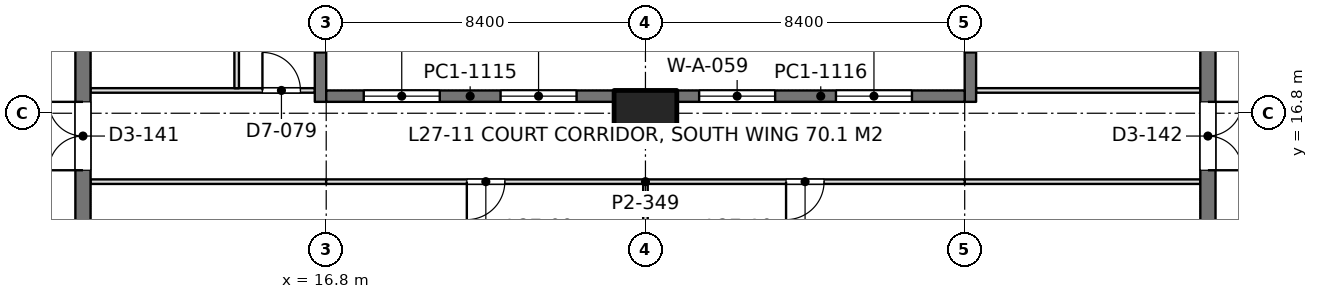
"""IFC4 building model, lengths in metres.
Left out: names, types, materials, properties, quantities, classifications, styles, units other than length and angle.
Written with IfcOpenShell. Run it as: python <this file> out.ifc"""

import sys

from ifc_helpers import new_model, si_unit, direction, frame, frame_2d, origin, origin_2d, place, context, subcontext, project, spatial, rectangle, extrude, element, fill, save


model = new_model("IFC4")
c1 = context("Model", 3, precision=1e-05, world=origin(), true_north=direction((0.0, 1.0)))
c2 = subcontext(c1, "Body", "Model", "MODEL_VIEW")
j1 = project(units=[si_unit("LENGTHUNIT", "METRE"), si_unit("PLANEANGLEUNIT", "RADIAN")], contexts=[c1])
p1 = place(None, origin())
s1 = spatial("IfcSite", under=j1, at=p1, CompositionType="ELEMENT")
p2 = place(p1, origin())
s2 = spatial("IfcBuilding", under=s1, at=p2, CompositionType="ELEMENT")
p3 = place(p2, frame((0.0, 0.0, 121.8)))
s3 = spatial("IfcBuildingStorey", under=s2, at=p3, CompositionType="ELEMENT", Elevation=121.8)
p4 = place(p3, frame((25.2, 16.8, 0.0), z_axis=(0.0, 0.0, 1.0), x_axis=(1.0, 0.0, 0.0)))
e1 = element("IfcColumn", 1, at=p4, inside=s3, PredefinedType="COLUMN", context=c2, shape_type="SweptSolid", body=[
    extrude(rectangle(XDim=1.65, YDim=1.2, at=origin_2d()), origin(), (0.0, 0.0, 1.0), 4.2),
])
p5 = place(p3, frame((10.4, 13.05, 0.0), z_axis=(0.0, 0.0, 1.0), x_axis=(0.0, 1.0, 0.0)))
e2 = element("IfcWall", 2, at=p5, inside=s3, PredefinedType="SHEAR", context=c2, shape_type="SweptSolid", body=[
    extrude(rectangle(XDim=24.3, YDim=0.4, at=frame_2d((12.15, 0.0))), origin(), (0.0, 0.0, 1.0), 4.2),
])
p6 = place(p5, frame((10.05, 0.0, 0.0)))
e3 = element("IfcOpeningElement", 3, at=p6, cuts=e2, PredefinedType="OPENING", context=c2, shape_type="SweptSolid", body=[
    extrude(rectangle(XDim=1.1, YDim=2.2, at=frame_2d((0.55, 1.1))), frame((0.0, 0.21, 0.0), z_axis=(0.0, -1.0, 0.0), x_axis=(1.0, 0.0, 0.0)), (0.0, 0.0, 1.0), 0.42),
])
p7 = place(p5, frame((12.9, 0.0, 0.0)))
e4 = element("IfcOpeningElement", 4, at=p7, cuts=e2, PredefinedType="OPENING", context=c2, shape_type="SweptSolid", body=[
    extrude(rectangle(XDim=1.1, YDim=2.2, at=frame_2d((0.55, 1.1))), frame((0.0, 0.21, 0.0), z_axis=(0.0, -1.0, 0.0), x_axis=(1.0, 0.0, 0.0)), (0.0, 0.0, 1.0), 0.42),
])
p8 = place(p5, frame((21.45, 0.0, 0.0)))
e5 = element("IfcOpeningElement", 5, at=p8, cuts=e2, PredefinedType="OPENING", context=c2, shape_type="SweptSolid", body=[
    extrude(rectangle(XDim=1.1, YDim=2.2, at=frame_2d((0.55, 1.1))), frame((0.0, 0.21, 0.0), z_axis=(0.0, -1.0, 0.0), x_axis=(1.0, 0.0, 0.0)), (0.0, 0.0, 1.0), 0.42),
])
p9 = place(p5, frame((2.25, 0.0, 0.0)))
e6 = element("IfcOpeningElement", 6, at=p9, cuts=e2, PredefinedType="OPENING", context=c2, shape_type="SweptSolid", body=[
    extrude(rectangle(XDim=1.8, YDim=2.4, at=frame_2d((0.9, 1.2))), frame((0.0, 0.21, 0.0), z_axis=(0.0, -1.0, 0.0), x_axis=(1.0, 0.0, 0.0)), (0.0, 0.0, 1.0), 0.42),
])
p10 = place(p5, frame((5.8, 0.0, 0.0)))
e7 = element("IfcOpeningElement", 7, at=p10, cuts=e2, PredefinedType="OPENING", context=c2, shape_type="SweptSolid", body=[
    extrude(rectangle(XDim=1.8, YDim=2.4, at=frame_2d((0.9, 1.2))), frame((0.0, 0.21, 0.0), z_axis=(0.0, -1.0, 0.0), x_axis=(1.0, 0.0, 0.0)), (0.0, 0.0, 1.0), 0.42),
])
p11 = place(p3, frame((40.0, 13.05, 0.0), z_axis=(0.0, 0.0, 1.0), x_axis=(0.0, 1.0, 0.0)))
e8 = element("IfcWall", 8, at=p11, inside=s3, PredefinedType="SHEAR", context=c2, shape_type="SweptSolid", body=[
    extrude(rectangle(XDim=24.3, YDim=0.4, at=frame_2d((12.15, 0.0))), origin(), (0.0, 0.0, 1.0), 4.2),
])
p12 = place(p11, frame((10.05, 0.0, 0.0)))
e9 = element("IfcOpeningElement", 9, at=p12, cuts=e8, PredefinedType="OPENING", context=c2, shape_type="SweptSolid", body=[
    extrude(rectangle(XDim=1.1, YDim=2.2, at=frame_2d((0.55, 1.1))), frame((0.0, 0.21, 0.0), z_axis=(0.0, -1.0, 0.0), x_axis=(1.0, 0.0, 0.0)), (0.0, 0.0, 1.0), 0.42),
])
p13 = place(p11, frame((12.9, 0.0, 0.0)))
e10 = element("IfcOpeningElement", 10, at=p13, cuts=e8, PredefinedType="OPENING", context=c2, shape_type="SweptSolid", body=[
    extrude(rectangle(XDim=1.1, YDim=2.2, at=frame_2d((0.55, 1.1))), frame((0.0, 0.21, 0.0), z_axis=(0.0, -1.0, 0.0), x_axis=(1.0, 0.0, 0.0)), (0.0, 0.0, 1.0), 0.42),
])
p14 = place(p11, frame((21.45, 0.0, 0.0)))
e11 = element("IfcOpeningElement", 11, at=p14, cuts=e8, PredefinedType="OPENING", context=c2, shape_type="SweptSolid", body=[
    extrude(rectangle(XDim=1.1, YDim=2.2, at=frame_2d((0.55, 1.1))), frame((0.0, 0.21, 0.0), z_axis=(0.0, -1.0, 0.0), x_axis=(1.0, 0.0, 0.0)), (0.0, 0.0, 1.0), 0.42),
])
p15 = place(p11, frame((2.25, 0.0, 0.0)))
e12 = element("IfcOpeningElement", 12, at=p15, cuts=e8, PredefinedType="OPENING", context=c2, shape_type="SweptSolid", body=[
    extrude(rectangle(XDim=1.8, YDim=2.4, at=frame_2d((0.9, 1.2))), frame((0.0, 0.21, 0.0), z_axis=(0.0, -1.0, 0.0), x_axis=(1.0, 0.0, 0.0)), (0.0, 0.0, 1.0), 0.42),
])
p16 = place(p11, frame((5.8, 0.0, 0.0)))
e13 = element("IfcOpeningElement", 13, at=p16, cuts=e8, PredefinedType="OPENING", context=c2, shape_type="SweptSolid", body=[
    extrude(rectangle(XDim=1.8, YDim=2.4, at=frame_2d((0.9, 1.2))), frame((0.0, 0.21, 0.0), z_axis=(0.0, -1.0, 0.0), x_axis=(1.0, 0.0, 0.0)), (0.0, 0.0, 1.0), 0.42),
])
p17 = place(p3, frame((16.65, 17.1, 0.0), z_axis=(0.0, 0.0, 1.0), x_axis=(0.0, 1.0, 0.0)))
e14 = element("IfcWall", 14, at=p17, inside=s3, PredefinedType="SOLIDWALL", context=c2, shape_type="SweptSolid", body=[
    extrude(rectangle(XDim=5.0, YDim=0.3, at=frame_2d((2.5, 0.0))), origin(), (0.0, 0.0, 1.0), 4.05),
])
p18 = place(p17, frame((1.3, 0.0, 0.1)))
e15 = element("IfcOpeningElement", 15, at=p18, cuts=e14, PredefinedType="OPENING", context=c2, shape_type="SweptSolid", body=[
    extrude(rectangle(XDim=2.0, YDim=3.0, at=frame_2d((1.0, 1.5))), frame((0.0, 0.16, 0.0), z_axis=(0.0, -1.0, 0.0), x_axis=(1.0, 0.0, 0.0)), (0.0, 0.0, 1.0), 0.32),
])
p19 = place(p3, frame((33.75, 17.1, 0.0), z_axis=(0.0, 0.0, 1.0), x_axis=(0.0, 1.0, 0.0)))
e16 = element("IfcWall", 16, at=p19, inside=s3, PredefinedType="SOLIDWALL", context=c2, shape_type="SweptSolid", body=[
    extrude(rectangle(XDim=5.0, YDim=0.3, at=frame_2d((2.5, 0.0))), origin(), (0.0, 0.0, 1.0), 4.05),
])
p20 = place(p19, frame((1.3, 0.0, 0.1)))
e17 = element("IfcOpeningElement", 17, at=p20, cuts=e16, PredefinedType="OPENING", context=c2, shape_type="SweptSolid", body=[
    extrude(rectangle(XDim=2.0, YDim=3.0, at=frame_2d((1.0, 1.5))), frame((0.0, 0.16, 0.0), z_axis=(0.0, -1.0, 0.0), x_axis=(1.0, 0.0, 0.0)), (0.0, 0.0, 1.0), 0.32),
])
p21 = place(p3, frame((16.8, 17.25, 0.0), z_axis=(0.0, 0.0, 1.0), x_axis=(1.0, 0.0, 0.0)))
e18 = element("IfcWall", 18, at=p21, inside=s3, PredefinedType="SOLIDWALL", context=c2, shape_type="SweptSolid", body=[
    extrude(rectangle(XDim=7.575, YDim=0.3, at=frame_2d((3.788, 0.0))), origin(), (0.0, 0.0, 1.0), 4.05),
])
p22 = place(p21, frame((0.988, 0.0, 0.1)))
e19 = element("IfcOpeningElement", 19, at=p22, cuts=e18, PredefinedType="OPENING", context=c2, shape_type="SweptSolid", body=[
    extrude(rectangle(XDim=2.0, YDim=3.0, at=frame_2d((1.0, 1.5))), frame((0.0, 0.16, 0.0), z_axis=(0.0, -1.0, 0.0), x_axis=(1.0, 0.0, 0.0)), (0.0, 0.0, 1.0), 0.32),
])
p23 = place(p21, frame((4.587, 0.0, 0.1)))
e20 = element("IfcOpeningElement", 20, at=p23, cuts=e18, PredefinedType="OPENING", context=c2, shape_type="SweptSolid", body=[
    extrude(rectangle(XDim=2.0, YDim=3.0, at=frame_2d((1.0, 1.5))), frame((0.0, 0.16, 0.0), z_axis=(0.0, -1.0, 0.0), x_axis=(1.0, 0.0, 0.0)), (0.0, 0.0, 1.0), 0.32),
])
p24 = place(p3, frame((26.025, 17.25, 0.0), z_axis=(0.0, 0.0, 1.0), x_axis=(1.0, 0.0, 0.0)))
e21 = element("IfcWall", 21, at=p24, inside=s3, PredefinedType="SOLIDWALL", context=c2, shape_type="SweptSolid", body=[
    extrude(rectangle(XDim=7.575, YDim=0.3, at=frame_2d((3.788, 0.0))), origin(), (0.0, 0.0, 1.0), 4.05),
])
p25 = place(p24, frame((0.587, 0.0, 0.1)))
e22 = element("IfcOpeningElement", 22, at=p25, cuts=e21, PredefinedType="OPENING", context=c2, shape_type="SweptSolid", body=[
    extrude(rectangle(XDim=2.0, YDim=3.0, at=frame_2d((1.0, 1.5))), frame((0.0, 0.16, 0.0), z_axis=(0.0, -1.0, 0.0), x_axis=(1.0, 0.0, 0.0)), (0.0, 0.0, 1.0), 0.32),
])
p26 = place(p24, frame((4.188, 0.0, 0.1)))
e23 = element("IfcOpeningElement", 23, at=p26, cuts=e21, PredefinedType="OPENING", context=c2, shape_type="SweptSolid", body=[
    extrude(rectangle(XDim=2.0, YDim=3.0, at=frame_2d((1.0, 1.5))), frame((0.0, 0.16, 0.0), z_axis=(0.0, -1.0, 0.0), x_axis=(1.0, 0.0, 0.0)), (0.0, 0.0, 1.0), 0.32),
])
p27 = place(p3, frame((10.598, 17.4, 0.0), z_axis=(0.0, 0.0, 1.0), x_axis=(1.0, 0.0, 0.0)))
e24 = element("IfcWall", 24, at=p27, inside=s3, PredefinedType="PARTITIONING", context=c2, shape_type="SweptSolid", body=[
    extrude(rectangle(XDim=5.904, YDim=0.12, at=frame_2d((2.952, 0.0))), origin(), (0.0, 0.0, 1.0), 3.55),
])
p28 = place(p27, frame((4.524, 0.0, 0.0)))
e25 = element("IfcOpeningElement", 25, at=p28, cuts=e24, PredefinedType="OPENING", context=c2, shape_type="SweptSolid", body=[
    extrude(rectangle(XDim=1.0, YDim=2.4, at=frame_2d((0.5, 1.2))), frame((0.0, 0.07, 0.0), z_axis=(0.0, -1.0, 0.0), x_axis=(1.0, 0.0, 0.0)), (0.0, 0.0, 1.0), 0.14),
])
p29 = place(p3, frame((14.444, 17.458, 0.0), z_axis=(0.0, 0.0, 1.0), x_axis=(0.0, 1.0, 0.0)))
e26 = element("IfcWall", 26, at=p29, inside=s3, PredefinedType="PARTITIONING", context=c2, shape_type="SweptSolid", body=[
    extrude(rectangle(XDim=4.644, YDim=0.12, at=frame_2d((2.322, 0.0))), origin(), (0.0, 0.0, 1.0), 3.6),
])
p30 = place(p3, frame((33.898, 17.4, 0.0), z_axis=(0.0, 0.0, 1.0), x_axis=(1.0, 0.0, 0.0)))
e27 = element("IfcWall", 27, at=p30, inside=s3, PredefinedType="PARTITIONING", context=c2, shape_type="SweptSolid", body=[
    extrude(rectangle(XDim=5.904, YDim=0.12, at=frame_2d((2.952, 0.0))), origin(), (0.0, 0.0, 1.0), 3.55),
])
for number, where, z_axis, x_axis in (
    (28, (10.598, 15.0, 0.0), (0.0, 0.0, 1.0), (1.0, 0.0, 0.0)),
    (29, (33.598, 15.0, 0.0), (0.0, 0.0, 1.0), (1.0, 0.0, 0.0)),
):
    element("IfcWall", number, at=place(p3, frame(where, z_axis=z_axis, x_axis=x_axis)), inside=s3, PredefinedType="PARTITIONING", context=c2, shape_type="SweptSolid", body=[
        extrude(rectangle(XDim=6.204, YDim=0.12, at=frame_2d((3.102, 0.0))), origin(), (0.0, 0.0, 1.0), 3.55),
    ])
p31 = place(p3, frame((25.2, 12.658, 0.0), z_axis=(0.0, 0.0, 1.0), x_axis=(0.0, 1.0, 0.0)))
e30 = element("IfcWall", 30, at=p31, inside=s3, PredefinedType="PARTITIONING", context=c2, shape_type="SweptSolid", body=[
    extrude(rectangle(XDim=2.284, YDim=0.12, at=frame_2d((1.142, 0.0))), origin(), (0.0, 0.0, 1.0), 3.55),
])
p32 = place(p3, frame((16.798, 15.0, 0.0), z_axis=(0.0, 0.0, 1.0), x_axis=(1.0, 0.0, 0.0)))
e31 = element("IfcWall", 31, at=p32, inside=s3, PredefinedType="PARTITIONING", context=c2, shape_type="SweptSolid", body=[
    extrude(rectangle(XDim=16.804, YDim=0.12, at=frame_2d((8.402, 0.0))), origin(), (0.0, 0.0, 1.0), 3.55),
])
p33 = place(p32, frame((3.702, 0.0, 0.0)))
e32 = element("IfcOpeningElement", 32, at=p33, cuts=e31, PredefinedType="OPENING", context=c2, shape_type="SweptSolid", body=[
    extrude(rectangle(XDim=1.0, YDim=2.4, at=frame_2d((0.5, 1.2))), frame((0.0, 0.07, 0.0), z_axis=(0.0, -1.0, 0.0), x_axis=(1.0, 0.0, 0.0)), (0.0, 0.0, 1.0), 0.14),
])
p34 = place(p32, frame((12.102, 0.0, 0.0)))
e33 = element("IfcOpeningElement", 33, at=p34, cuts=e31, PredefinedType="OPENING", context=c2, shape_type="SweptSolid", body=[
    extrude(rectangle(XDim=1.0, YDim=2.4, at=frame_2d((0.5, 1.2))), frame((0.0, 0.07, 0.0), z_axis=(0.0, -1.0, 0.0), x_axis=(1.0, 0.0, 0.0)), (0.0, 0.0, 1.0), 0.14),
])
p35 = place(p22, origin())
e34 = element("IfcWindow", 34, at=p35, inside=s3, PartitioningType="SINGLE_PANEL", PredefinedType="WINDOW", context=c2, shape_type="SweptSolid", body=[
    extrude(rectangle(XDim=2.0, YDim=3.0, at=frame_2d((1.0, 1.5))), frame((0.0, 0.03, 0.0), z_axis=(0.0, -1.0, 0.0), x_axis=(1.0, 0.0, 0.0)), (0.0, 0.0, 1.0), 0.06),
])
fill(e19, e34)
p36 = place(p23, origin())
e35 = element("IfcWindow", 35, at=p36, inside=s3, PartitioningType="SINGLE_PANEL", PredefinedType="WINDOW", context=c2, shape_type="SweptSolid", body=[
    extrude(rectangle(XDim=2.0, YDim=3.0, at=frame_2d((1.0, 1.5))), frame((0.0, 0.03, 0.0), z_axis=(0.0, -1.0, 0.0), x_axis=(1.0, 0.0, 0.0)), (0.0, 0.0, 1.0), 0.06),
])
fill(e20, e35)
p37 = place(p25, origin())
e36 = element("IfcWindow", 36, at=p37, inside=s3, PartitioningType="SINGLE_PANEL", PredefinedType="WINDOW", context=c2, shape_type="SweptSolid", body=[
    extrude(rectangle(XDim=2.0, YDim=3.0, at=frame_2d((1.0, 1.5))), frame((0.0, 0.03, 0.0), z_axis=(0.0, -1.0, 0.0), x_axis=(1.0, 0.0, 0.0)), (0.0, 0.0, 1.0), 0.06),
])
fill(e22, e36)
p38 = place(p26, origin())
e37 = element("IfcWindow", 37, at=p38, inside=s3, PartitioningType="SINGLE_PANEL", PredefinedType="WINDOW", context=c2, shape_type="SweptSolid", body=[
    extrude(rectangle(XDim=2.0, YDim=3.0, at=frame_2d((1.0, 1.5))), frame((0.0, 0.03, 0.0), z_axis=(0.0, -1.0, 0.0), x_axis=(1.0, 0.0, 0.0)), (0.0, 0.0, 1.0), 0.06),
])
fill(e23, e37)
p39 = place(p9, origin())
e38 = element("IfcDoor", 38, at=p39, inside=s3, OperationType="DOUBLE_DOOR_SINGLE_SWING", PredefinedType="DOOR", context=c2, shape_type="SweptSolid", body=[
    extrude(rectangle(XDim=1.8, YDim=2.4, at=frame_2d((0.9, 1.2))), frame((0.0, 0.025, 0.0), z_axis=(0.0, -1.0, 0.0), x_axis=(1.0, 0.0, 0.0)), (0.0, 0.0, 1.0), 0.05),
])
fill(e6, e38)
p40 = place(p15, frame((1.8, 0.0, 0.0), z_axis=(0.0, 0.0, 1.0), x_axis=(-1.0, 0.0, 0.0)))
e39 = element("IfcDoor", 39, at=p40, inside=s3, OperationType="DOUBLE_DOOR_SINGLE_SWING", PredefinedType="DOOR", context=c2, shape_type="SweptSolid", body=[
    extrude(rectangle(XDim=1.8, YDim=2.4, at=frame_2d((0.9, 1.2))), frame((0.0, 0.025, 0.0), z_axis=(0.0, -1.0, 0.0), x_axis=(1.0, 0.0, 0.0)), (0.0, 0.0, 1.0), 0.05),
])
fill(e12, e39)
p41 = place(p28, origin())
e40 = element("IfcDoor", 40, at=p41, inside=s3, OperationType="SINGLE_SWING_LEFT", PredefinedType="DOOR", context=c2, shape_type="SweptSolid", body=[
    extrude(rectangle(XDim=1.0, YDim=2.4, at=frame_2d((0.5, 1.2))), frame((0.0, 0.025, 0.0), z_axis=(0.0, -1.0, 0.0), x_axis=(1.0, 0.0, 0.0)), (0.0, 0.0, 1.0), 0.05),
])
fill(e25, e40)
p42 = place(p33, frame((1.0, 0.0, 0.0), z_axis=(0.0, 0.0, 1.0), x_axis=(-1.0, 0.0, 0.0)))
e41 = element("IfcDoor", 41, at=p42, inside=s3, OperationType="SINGLE_SWING_RIGHT", PredefinedType="DOOR", context=c2, shape_type="SweptSolid", body=[
    extrude(rectangle(XDim=1.0, YDim=2.4, at=frame_2d((0.5, 1.2))), frame((0.0, 0.025, 0.0), z_axis=(0.0, -1.0, 0.0), x_axis=(1.0, 0.0, 0.0)), (0.0, 0.0, 1.0), 0.05),
])
fill(e32, e41)
p43 = place(p34, frame((1.0, 0.0, 0.0), z_axis=(0.0, 0.0, 1.0), x_axis=(-1.0, 0.0, 0.0)))
e42 = element("IfcDoor", 42, at=p43, inside=s3, OperationType="SINGLE_SWING_RIGHT", PredefinedType="DOOR", context=c2, shape_type="SweptSolid", body=[
    extrude(rectangle(XDim=1.0, YDim=2.4, at=frame_2d((0.5, 1.2))), frame((0.0, 0.025, 0.0), z_axis=(0.0, -1.0, 0.0), x_axis=(1.0, 0.0, 0.0)), (0.0, 0.0, 1.0), 0.05),
])
fill(e33, e42)
save(model, sys.argv[1])
